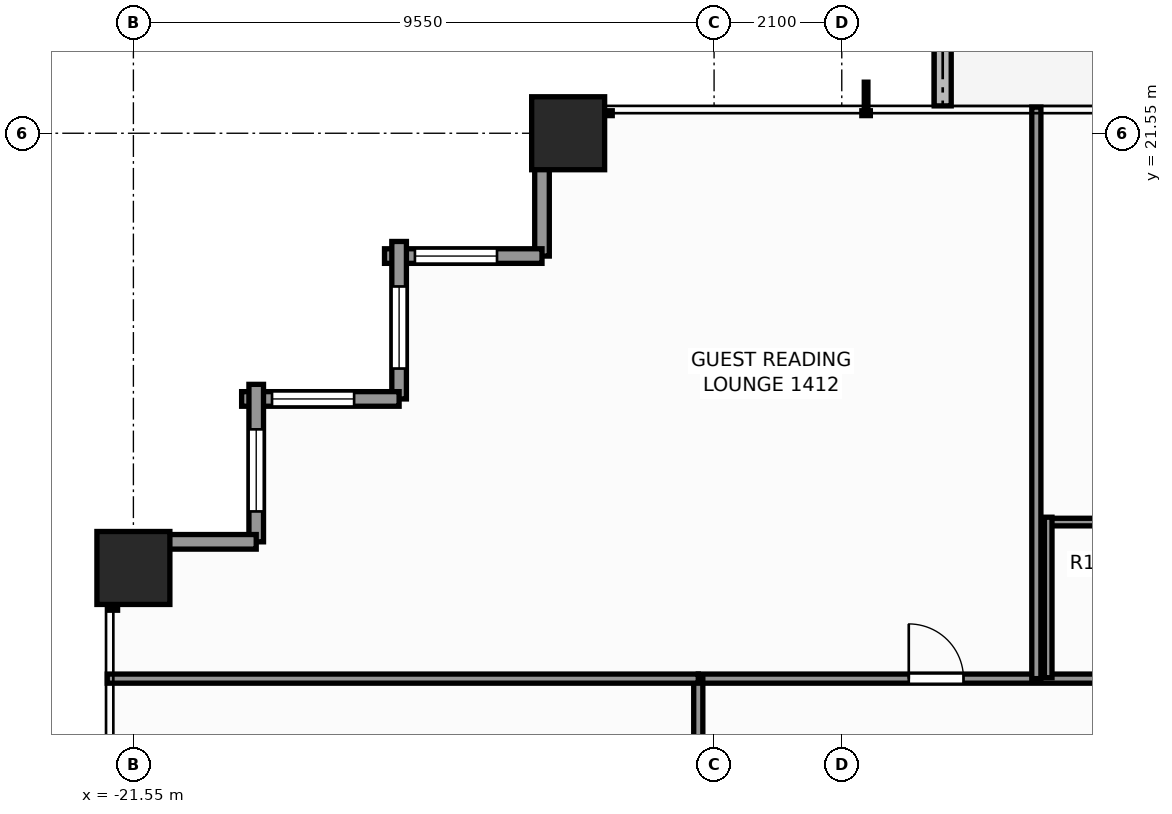
"""IFC4 building model, lengths in metres.
Left out: names, types, materials, properties, quantities, classifications, styles, units other than length and angle.
Written with IfcOpenShell. Run it as: python <this file> out.ifc"""

import sys

from ifc_helpers import new_model, si_unit, direction, frame, frame_2d, origin, origin_2d, place, context, subcontext, project, spatial, rectangle, extrude, element, fill, save


model = new_model("IFC4")
c1 = context("Model", 3, precision=1e-05, world=origin(), true_north=direction((0.0, 1.0)))
c2 = subcontext(c1, "Body", "Model", "MODEL_VIEW")
j1 = project(units=[si_unit("LENGTHUNIT", "METRE"), si_unit("PLANEANGLEUNIT", "RADIAN")], contexts=[c1])
p1 = place(None, origin())
s1 = spatial("IfcSite", under=j1, at=p1, CompositionType="ELEMENT")
p2 = place(p1, origin())
s2 = spatial("IfcBuilding", under=s1, at=p2, CompositionType="ELEMENT")
p3 = place(p2, frame((0.0, 0.0, 50.2)))
s3 = spatial("IfcBuildingStorey", under=s2, at=p3, CompositionType="ELEMENT", Elevation=50.2)
for number, where, z_axis, x_axis in (
    (1, (-14.4, 21.55, 0.0), (0.0, 0.0, 1.0), (1.0, 0.0, 0.0)),
    (2, (-21.55, 14.4, 0.0), (0.0, 0.0, 1.0), (1.0, 0.0, 0.0)),
):
    element("IfcColumn", number, at=place(p3, frame(where, z_axis=z_axis, x_axis=x_axis)), inside=s3, PredefinedType="COLUMN", context=c2, shape_type="SweptSolid", body=[
        extrude(rectangle(XDim=1.2, YDim=1.2, at=origin_2d()), origin(), (0.0, 0.0, 1.0), 3.3),
    ])
p4 = place(p3, frame((-8.24, 23.313, -0.06), z_axis=(0.0, 0.0, 1.0), x_axis=(0.0, -1.0, 0.0)))
e3 = element("IfcWall", 3, at=p4, inside=s3, PredefinedType="PARAPET", context=c2, shape_type="SweptSolid", body=[
    extrude(rectangle(XDim=1.313, YDim=0.28, at=frame_2d((0.656, 0.0))), origin(), (0.0, 0.0, 1.0), 0.42),
])
p5 = place(p3, frame((-14.83, 19.53, 0.0), z_axis=(0.0, 0.0, 1.0), x_axis=(0.0, 1.0, 0.0)))
e4 = element("IfcWall", 4, at=p5, inside=s3, PredefinedType="STANDARD", context=c2, shape_type="SweptSolid", body=[
    extrude(rectangle(XDim=2.59, YDim=0.24, at=frame_2d((1.295, 0.0))), origin(), (0.0, 0.0, 1.0), 2.439),
])
p6 = place(p3, frame((-17.42, 19.53, 0.0), z_axis=(0.0, 0.0, 1.0), x_axis=(1.0, 0.0, 0.0)))
e5 = element("IfcWall", 5, at=p6, inside=s3, PredefinedType="STANDARD", context=c2, shape_type="SweptSolid", body=[
    extrude(rectangle(XDim=2.59, YDim=0.24, at=frame_2d((1.295, 0.0))), origin(), (0.0, 0.0, 1.0), 2.439),
])
p7 = place(p6, frame((0.5, 0.0, 0.65)))
e6 = element("IfcOpeningElement", 6, at=p7, cuts=e5, PredefinedType="OPENING", context=c2, shape_type="SweptSolid", body=[
    extrude(rectangle(XDim=1.35, YDim=1.55, at=frame_2d((0.675, 0.775))), frame((0.0, 0.13, 0.0), z_axis=(0.0, -1.0, 0.0), x_axis=(1.0, 0.0, 0.0)), (0.0, 0.0, 1.0), 0.26),
])
p8 = place(p3, frame((-17.18, 17.18, 0.0), z_axis=(0.0, 0.0, 1.0), x_axis=(0.0, 1.0, 0.0)))
e7 = element("IfcWall", 7, at=p8, inside=s3, PredefinedType="STANDARD", context=c2, shape_type="SweptSolid", body=[
    extrude(rectangle(XDim=2.59, YDim=0.24, at=frame_2d((1.295, 0.0))), origin(), (0.0, 0.0, 1.0), 2.439),
])
p9 = place(p8, frame((0.5, 0.0, 0.65)))
e8 = element("IfcOpeningElement", 8, at=p9, cuts=e7, PredefinedType="OPENING", context=c2, shape_type="SweptSolid", body=[
    extrude(rectangle(XDim=1.35, YDim=1.55, at=frame_2d((0.675, 0.775))), frame((0.0, 0.13, 0.0), z_axis=(0.0, -1.0, 0.0), x_axis=(1.0, 0.0, 0.0)), (0.0, 0.0, 1.0), 0.26),
])
p10 = place(p3, frame((-19.77, 17.18, 0.0), z_axis=(0.0, 0.0, 1.0), x_axis=(1.0, 0.0, 0.0)))
e9 = element("IfcWall", 9, at=p10, inside=s3, PredefinedType="STANDARD", context=c2, shape_type="SweptSolid", body=[
    extrude(rectangle(XDim=2.59, YDim=0.24, at=frame_2d((1.295, 0.0))), origin(), (0.0, 0.0, 1.0), 2.439),
])
p11 = place(p10, frame((0.5, 0.0, 0.65)))
e10 = element("IfcOpeningElement", 10, at=p11, cuts=e9, PredefinedType="OPENING", context=c2, shape_type="SweptSolid", body=[
    extrude(rectangle(XDim=1.35, YDim=1.55, at=frame_2d((0.675, 0.775))), frame((0.0, 0.13, 0.0), z_axis=(0.0, -1.0, 0.0), x_axis=(1.0, 0.0, 0.0)), (0.0, 0.0, 1.0), 0.26),
])
p12 = place(p3, frame((-19.53, 14.83, 0.0), z_axis=(0.0, 0.0, 1.0), x_axis=(0.0, 1.0, 0.0)))
e11 = element("IfcWall", 11, at=p12, inside=s3, PredefinedType="STANDARD", context=c2, shape_type="SweptSolid", body=[
    extrude(rectangle(XDim=2.59, YDim=0.24, at=frame_2d((1.295, 0.0))), origin(), (0.0, 0.0, 1.0), 2.439),
])
p13 = place(p12, frame((0.5, 0.0, 0.65)))
e12 = element("IfcOpeningElement", 12, at=p13, cuts=e11, PredefinedType="OPENING", context=c2, shape_type="SweptSolid", body=[
    extrude(rectangle(XDim=1.35, YDim=1.55, at=frame_2d((0.675, 0.775))), frame((0.0, 0.13, 0.0), z_axis=(0.0, -1.0, 0.0), x_axis=(1.0, 0.0, 0.0)), (0.0, 0.0, 1.0), 0.26),
])
p14 = place(p3, frame((-22.12, 14.83, 0.0), z_axis=(0.0, 0.0, 1.0), x_axis=(1.0, 0.0, 0.0)))
e13 = element("IfcWall", 13, at=p14, inside=s3, PredefinedType="STANDARD", context=c2, shape_type="SweptSolid", body=[
    extrude(rectangle(XDim=2.59, YDim=0.24, at=frame_2d((1.295, 0.0))), origin(), (0.0, 0.0, 1.0), 2.439),
])
p15 = place(p3, frame((-12.26, 12.58, 0.0), z_axis=(0.0, 0.0, 1.0), x_axis=(1.0, 0.0, 0.0)))
e14 = element("IfcWall", 14, at=p15, inside=s3, PredefinedType="PARTITIONING", context=c2, shape_type="SweptSolid", body=[
    extrude(rectangle(XDim=24.84, YDim=0.15, at=frame_2d((12.42, 0.0))), origin(), (0.0, 0.0, 1.0), 2.272),
])
p16 = place(p15, frame((3.462, 0.0, 0.0)))
e15 = element("IfcOpeningElement", 15, at=p16, cuts=e14, PredefinedType="OPENING", context=c2, shape_type="SweptSolid", body=[
    extrude(rectangle(XDim=0.9, YDim=2.06, at=frame_2d((0.45, 1.03))), frame((0.0, 0.085, 0.0), z_axis=(0.0, -1.0, 0.0), x_axis=(1.0, 0.0, 0.0)), (0.0, 0.0, 1.0), 0.17),
])
p17 = place(p15, frame((8.723, 0.0, 0.0)))
e16 = element("IfcOpeningElement", 16, at=p17, cuts=e14, PredefinedType="OPENING", context=c2, shape_type="SweptSolid", body=[
    extrude(rectangle(XDim=0.95, YDim=2.06, at=frame_2d((0.475, 1.03))), frame((0.0, 0.085, 0.0), z_axis=(0.0, -1.0, 0.0), x_axis=(1.0, 0.0, 0.0)), (0.0, 0.0, 1.0), 0.17),
])
p18 = place(p15, frame((14.157, 0.0, 0.0)))
e17 = element("IfcOpeningElement", 17, at=p18, cuts=e14, PredefinedType="OPENING", context=c2, shape_type="SweptSolid", body=[
    extrude(rectangle(XDim=0.95, YDim=2.06, at=frame_2d((0.475, 1.03))), frame((0.0, 0.085, 0.0), z_axis=(0.0, -1.0, 0.0), x_axis=(1.0, 0.0, 0.0)), (0.0, 0.0, 1.0), 0.17),
])
p19 = place(p15, frame((19.542, 0.0, 0.0)))
e18 = element("IfcOpeningElement", 18, at=p19, cuts=e14, PredefinedType="OPENING", context=c2, shape_type="SweptSolid", body=[
    extrude(rectangle(XDim=0.9, YDim=2.06, at=frame_2d((0.45, 1.03))), frame((0.0, 0.085, 0.0), z_axis=(0.0, -1.0, 0.0), x_axis=(1.0, 0.0, 0.0)), (0.0, 0.0, 1.0), 0.17),
])
p20 = place(p3, frame((-12.26, -12.26, 0.0), z_axis=(0.0, 0.0, 1.0), x_axis=(0.0, 1.0, 0.0)))
e19 = element("IfcWall", 19, at=p20, inside=s3, PredefinedType="PARTITIONING", context=c2, shape_type="SweptSolid", body=[
    extrude(rectangle(XDim=24.84, YDim=0.15, at=frame_2d((12.42, 0.0))), origin(), (0.0, 0.0, 1.0), 2.272),
])
p21 = place(p20, frame((3.448, 0.0, 0.0)))
e20 = element("IfcOpeningElement", 20, at=p21, cuts=e19, PredefinedType="OPENING", context=c2, shape_type="SweptSolid", body=[
    extrude(rectangle(XDim=0.95, YDim=2.06, at=frame_2d((0.475, 1.03))), frame((0.0, 0.085, 0.0), z_axis=(0.0, -1.0, 0.0), x_axis=(1.0, 0.0, 0.0)), (0.0, 0.0, 1.0), 0.17),
])
p22 = place(p20, frame((9.218, 0.0, 0.0)))
e21 = element("IfcOpeningElement", 21, at=p22, cuts=e19, PredefinedType="OPENING", context=c2, shape_type="SweptSolid", body=[
    extrude(rectangle(XDim=0.95, YDim=2.06, at=frame_2d((0.475, 1.03))), frame((0.0, 0.085, 0.0), z_axis=(0.0, -1.0, 0.0), x_axis=(1.0, 0.0, 0.0)), (0.0, 0.0, 1.0), 0.17),
])
p23 = place(p20, frame((14.558, 0.0, 0.0)))
e22 = element("IfcOpeningElement", 22, at=p23, cuts=e19, PredefinedType="OPENING", context=c2, shape_type="SweptSolid", body=[
    extrude(rectangle(XDim=0.95, YDim=2.06, at=frame_2d((0.475, 1.03))), frame((0.0, 0.085, 0.0), z_axis=(0.0, -1.0, 0.0), x_axis=(1.0, 0.0, 0.0)), (0.0, 0.0, 1.0), 0.17),
])
p24 = place(p20, frame((20.852, 0.0, 0.0)))
e23 = element("IfcOpeningElement", 23, at=p24, cuts=e19, PredefinedType="OPENING", context=c2, shape_type="SweptSolid", body=[
    extrude(rectangle(XDim=0.95, YDim=2.06, at=frame_2d((0.475, 1.03))), frame((0.0, 0.085, 0.0), z_axis=(0.0, -1.0, 0.0), x_axis=(1.0, 0.0, 0.0)), (0.0, 0.0, 1.0), 0.17),
])
p25 = place(p3, frame((-21.98, 12.58, 0.0), z_axis=(0.0, 0.0, 1.0), x_axis=(1.0, 0.0, 0.0)))
e24 = element("IfcWall", 24, at=p25, inside=s3, PredefinedType="PARTITIONING", context=c2, shape_type="SweptSolid", body=[
    extrude(rectangle(XDim=9.72, YDim=0.15, at=frame_2d((4.86, 0.0))), origin(), (0.0, 0.0, 1.0), 2.272),
])
p26 = place(p3, frame((-6.7, 12.58, 0.0), z_axis=(0.0, 0.0, 1.0), x_axis=(0.0, 1.0, 0.0)))
e25 = element("IfcWall", 25, at=p26, inside=s3, PredefinedType="PARTITIONING", context=c2, shape_type="SweptSolid", body=[
    extrude(rectangle(XDim=9.4, YDim=0.15, at=frame_2d((4.7, 0.0))), origin(), (0.0, 0.0, 1.0), 2.429),
])
p27 = place(p3, frame((-6.565, 15.155, 0.0), z_axis=(0.0, 0.0, 1.0), x_axis=(1.0, 0.0, 0.0)))
e26 = element("IfcWall", 26, at=p27, inside=s3, PredefinedType="PARTITIONING", context=c2, shape_type="SweptSolid", body=[
    extrude(rectangle(XDim=2.52, YDim=0.125, at=frame_2d((1.26, 0.0))), origin(), (0.0, 0.0, 1.0), 2.272),
])
p28 = place(p3, frame((-6.505, 12.595, 0.0), z_axis=(0.0, 0.0, 1.0), x_axis=(0.0, 1.0, 0.0)))
e27 = element("IfcWall", 27, at=p28, inside=s3, PredefinedType="PARTITIONING", context=c2, shape_type="SweptSolid", body=[
    extrude(rectangle(XDim=2.64, YDim=0.125, at=frame_2d((1.32, 0.0))), origin(), (0.0, 0.0, 1.0), 3.06),
])
p29 = place(p7, origin())
e28 = element("IfcWindow", 28, at=p29, inside=s3, PartitioningType="SINGLE_PANEL", PredefinedType="WINDOW", context=c2, shape_type="SweptSolid", body=[
    extrude(rectangle(XDim=1.35, YDim=1.55, at=frame_2d((0.675, 0.775))), frame((0.0, 0.03, 0.0), z_axis=(0.0, -1.0, 0.0), x_axis=(1.0, 0.0, 0.0)), (0.0, 0.0, 1.0), 0.06),
])
fill(e6, e28)
p30 = place(p9, origin())
e29 = element("IfcWindow", 29, at=p30, inside=s3, PartitioningType="SINGLE_PANEL", PredefinedType="WINDOW", context=c2, shape_type="SweptSolid", body=[
    extrude(rectangle(XDim=1.35, YDim=1.55, at=frame_2d((0.675, 0.775))), frame((0.0, 0.03, 0.0), z_axis=(0.0, -1.0, 0.0), x_axis=(1.0, 0.0, 0.0)), (0.0, 0.0, 1.0), 0.06),
])
fill(e8, e29)
p31 = place(p11, origin())
e30 = element("IfcWindow", 30, at=p31, inside=s3, PartitioningType="SINGLE_PANEL", PredefinedType="WINDOW", context=c2, shape_type="SweptSolid", body=[
    extrude(rectangle(XDim=1.35, YDim=1.55, at=frame_2d((0.675, 0.775))), frame((0.0, 0.03, 0.0), z_axis=(0.0, -1.0, 0.0), x_axis=(1.0, 0.0, 0.0)), (0.0, 0.0, 1.0), 0.06),
])
fill(e10, e30)
p32 = place(p13, origin())
e31 = element("IfcWindow", 31, at=p32, inside=s3, PartitioningType="SINGLE_PANEL", PredefinedType="WINDOW", context=c2, shape_type="SweptSolid", body=[
    extrude(rectangle(XDim=1.35, YDim=1.55, at=frame_2d((0.675, 0.775))), frame((0.0, 0.03, 0.0), z_axis=(0.0, -1.0, 0.0), x_axis=(1.0, 0.0, 0.0)), (0.0, 0.0, 1.0), 0.06),
])
fill(e12, e31)
p33 = place(p16, origin())
e32 = element("IfcDoor", 32, at=p33, inside=s3, OperationType="SINGLE_SWING_LEFT", PredefinedType="DOOR", context=c2, shape_type="SweptSolid", body=[
    extrude(rectangle(XDim=0.9, YDim=2.06, at=frame_2d((0.45, 1.03))), frame((0.0, 0.025, 0.0), z_axis=(0.0, -1.0, 0.0), x_axis=(1.0, 0.0, 0.0)), (0.0, 0.0, 1.0), 0.05),
])
fill(e15, e32)
save(model, sys.argv[1])
